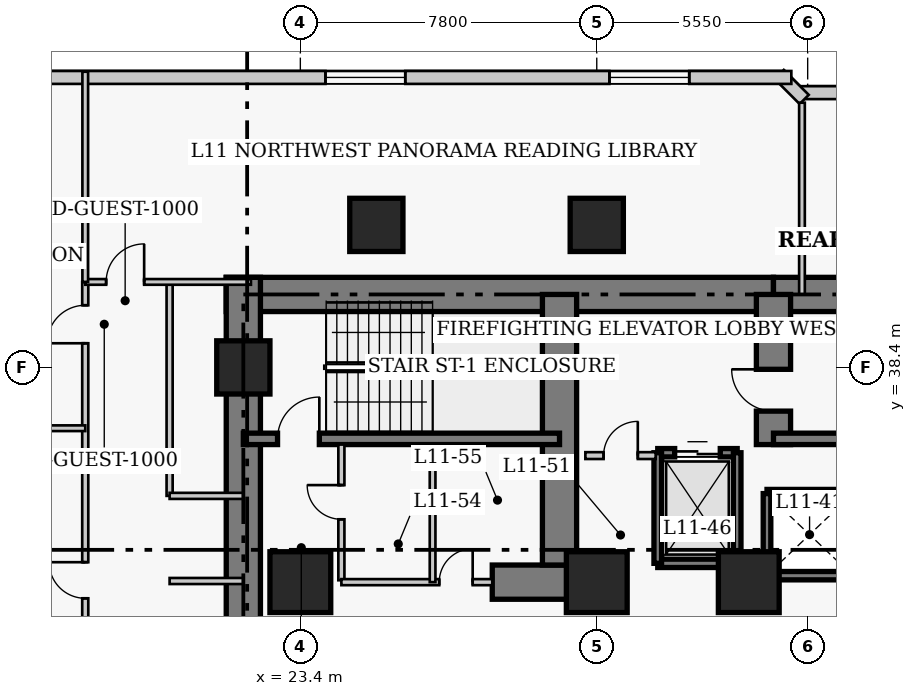
"""IFC4 building model, lengths in metres.
Left out: names, types, materials, properties, quantities, classifications, styles, units other than length and angle.
Written with IfcOpenShell. Run it as: python <this file> out.ifc"""

import sys

from ifc_helpers import new_model, si_unit, direction, frame, frame_2d, origin, origin_2d, place, context, subcontext, project, spatial, rectangle, extrude, element, fill, save


model = new_model("IFC4")
c1 = context("Model", 3, precision=1e-05, world=origin(), true_north=direction((0.0, 1.0)))
c2 = subcontext(c1, "Body", "Model", "MODEL_VIEW")
j1 = project(units=[si_unit("LENGTHUNIT", "METRE"), si_unit("PLANEANGLEUNIT", "RADIAN")], contexts=[c1])
p1 = place(None, origin())
s1 = spatial("IfcSite", under=j1, at=p1, CompositionType="ELEMENT")
p2 = place(p1, origin())
s2 = spatial("IfcBuilding", under=s1, at=p2, CompositionType="ELEMENT")
p3 = place(p2, frame((0.0, 0.0, 48.8)))
s3 = spatial("IfcBuildingStorey", under=s2, at=p3, CompositionType="ELEMENT", Elevation=48.8)
p4 = place(p3, frame((21.45, 40.32, 0.0), z_axis=(0.0, 0.0, 1.0), x_axis=(1.0, 0.0, 0.0)))
e1 = element("IfcWall", 1, at=p4, inside=s3, PredefinedType="SHEAR", context=c2, shape_type="SweptSolid", body=[
    extrude(rectangle(XDim=14.4, YDim=0.9, at=frame_2d((7.2, 0.0))), origin(), (0.0, 0.0, 1.0), 3.8),
])
p5 = place(p3, frame((35.85, 40.32, 0.0), z_axis=(0.0, 0.0, 1.0), x_axis=(1.0, 0.0, 0.0)))
e2 = element("IfcWall", 2, at=p5, inside=s3, PredefinedType="SHEAR", context=c2, shape_type="SweptSolid", body=[
    extrude(rectangle(XDim=12.6, YDim=0.9, at=frame_2d((6.3, 0.0))), origin(), (0.0, 0.0, 1.0), 3.8),
])
p6 = place(p3, frame((21.9, 27.05, 0.0), z_axis=(0.0, 0.0, 1.0), x_axis=(0.0, 1.0, 0.0)))
e3 = element("IfcWall", 3, at=p6, inside=s3, PredefinedType="SHEAR", context=c2, shape_type="SweptSolid", body=[
    extrude(rectangle(XDim=13.72, YDim=0.9, at=frame_2d((6.86, 0.0))), origin(), (0.0, 0.0, 1.0), 3.8),
])
p7 = place(p3, frame((28.45, 32.75, 0.0), z_axis=(0.0, 0.0, 1.0), x_axis=(1.0, 0.0, 0.0)))
e4 = element("IfcWall", 4, at=p7, inside=s3, PredefinedType="SHEAR", context=c2, shape_type="SweptSolid", body=[
    extrude(rectangle(XDim=2.4, YDim=0.9, at=frame_2d((1.2, 0.0))), origin(), (0.0, 0.0, 1.0), 3.8),
])
p8 = place(p3, frame((30.22, 33.2, 0.0), z_axis=(0.0, 0.0, 1.0), x_axis=(0.0, 1.0, 0.0)))
e5 = element("IfcWall", 5, at=p8, inside=s3, PredefinedType="SHEAR", context=c2, shape_type="SweptSolid", body=[
    extrude(rectangle(XDim=7.12, YDim=0.9, at=frame_2d((3.56, 0.0))), origin(), (0.0, 0.0, 1.0), 3.8),
])
p9 = place(p3, frame((35.85, 36.37, 0.0), z_axis=(0.0, 0.0, 1.0), x_axis=(0.0, 1.0, 0.0)))
e6 = element("IfcWall", 6, at=p9, inside=s3, PredefinedType="SHEAR", context=c2, shape_type="SweptSolid", body=[
    extrude(rectangle(XDim=3.95, YDim=0.9, at=frame_2d((1.975, 0.0))), origin(), (0.0, 0.0, 1.0), 3.8),
])
p10 = place(p9, frame((0.88, 0.0, 0.0)))
e7 = element("IfcOpeningElement", 7, at=p10, cuts=e6, PredefinedType="OPENING", context=c2, shape_type="SweptSolid", body=[
    extrude(rectangle(XDim=1.1, YDim=2.15, at=frame_2d((0.55, 1.075))), frame((0.0, 0.46, 0.0), z_axis=(0.0, -1.0, 0.0), x_axis=(1.0, 0.0, 0.0)), (0.0, 0.0, 1.0), 0.92),
])
p11 = place(p3, frame((21.9, 36.52, 0.0), z_axis=(0.0, 0.0, 1.0), x_axis=(1.0, 0.0, 0.0)))
e8 = element("IfcWall", 8, at=p11, inside=s3, PredefinedType="SHEAR", context=c2, shape_type="SweptSolid", body=[
    extrude(rectangle(XDim=8.32, YDim=0.3, at=frame_2d((4.16, 0.0))), origin(), (0.0, 0.0, 1.0), 3.8),
])
p12 = place(p11, frame((0.9, 0.0, 0.0)))
e9 = element("IfcOpeningElement", 9, at=p12, cuts=e8, PredefinedType="OPENING", context=c2, shape_type="SweptSolid", body=[
    extrude(rectangle(XDim=1.1, YDim=2.15, at=frame_2d((0.55, 1.075))), frame((0.0, 0.16, 0.0), z_axis=(0.0, -1.0, 0.0), x_axis=(1.0, 0.0, 0.0)), (0.0, 0.0, 1.0), 0.32),
])
p13 = place(p3, frame((35.85, 36.52, 0.0), z_axis=(0.0, 0.0, 1.0), x_axis=(1.0, 0.0, 0.0)))
e10 = element("IfcWall", 10, at=p13, inside=s3, PredefinedType="SHEAR", context=c2, shape_type="SweptSolid", body=[
    extrude(rectangle(XDim=8.33, YDim=0.3, at=frame_2d((4.165, 0.0))), origin(), (0.0, 0.0, 1.0), 3.8),
])
p14 = place(p3, frame((21.9, 38.4, 0.0), z_axis=(0.0, 0.0, 1.0), x_axis=(1.0, 0.0, 0.0)))
e11 = element("IfcColumn", 11, at=p14, inside=s3, PredefinedType="COLUMN", context=c2, shape_type="SweptSolid", body=[
    extrude(rectangle(XDim=1.4, YDim=1.4, at=origin_2d()), origin(), (0.0, 0.0, 1.0), 3.8),
])
for number, where, z_axis, x_axis in (
    (12, (23.4, 32.75, 0.0), (0.0, 0.0, 1.0), (1.0, 0.0, 0.0)),
    (13, (31.2, 32.75, 0.0), (0.0, 0.0, 1.0), (1.0, 0.0, 0.0)),
    (14, (35.2, 32.75, 0.0), (0.0, 0.0, 1.0), (1.0, 0.0, 0.0)),
):
    element("IfcColumn", number, at=place(p3, frame(where, z_axis=z_axis, x_axis=x_axis)), inside=s3, PredefinedType="COLUMN", context=c2, shape_type="SweptSolid", body=[
        extrude(rectangle(XDim=1.6, YDim=1.6, at=origin_2d()), origin(), (0.0, 0.0, 1.0), 3.8),
    ])
for number, where, z_axis, x_axis in (
    (15, (25.4, 42.15, 0.0), (0.0, 0.0, 1.0), (1.0, 0.0, 0.0)),
    (16, (31.2, 42.15, 0.0), (0.0, 0.0, 1.0), (1.0, 0.0, 0.0)),
):
    element("IfcColumn", number, at=place(p3, frame(where, z_axis=z_axis, x_axis=x_axis)), inside=s3, PredefinedType="COLUMN", context=c2, shape_type="SweptSolid", body=[
        extrude(rectangle(XDim=1.4, YDim=1.4, at=origin_2d()), origin(), (0.0, 0.0, 1.0), 3.8),
    ])
p15 = place(p3, frame((41.42, 45.63, 0.0), z_axis=(0.0, 0.0, 1.0), x_axis=(-1.0, 0.0, 0.0)))
e17 = element("IfcWall", 17, at=p15, inside=s3, PredefinedType="SOLIDWALL", context=c2, shape_type="SweptSolid", body=[
    extrude(rectangle(XDim=4.84, YDim=0.34, at=frame_2d((2.42, 0.0))), origin(), (0.0, 0.0, 1.0), 3.54),
])
p16 = place(p15, frame((1.37, 0.0, 0.85)))
e18 = element("IfcOpeningElement", 18, at=p16, cuts=e17, PredefinedType="OPENING", context=c2, shape_type="SweptSolid", body=[
    extrude(rectangle(XDim=2.1, YDim=1.85, at=frame_2d((1.05, 0.925))), frame((0.0, 0.18, 0.0), z_axis=(0.0, -1.0, 0.0), x_axis=(1.0, 0.0, 0.0)), (0.0, 0.0, 1.0), 0.36),
])
p17 = place(p3, frame((36.658, 45.451, 0.0), z_axis=(0.0, 0.0, 1.0), x_axis=(-0.707106781187, 0.707106781187, 0.0)))
e19 = element("IfcWall", 19, at=p17, inside=s3, PredefinedType="SOLIDWALL", context=c2, shape_type="SweptSolid", body=[
    extrude(rectangle(XDim=0.929, YDim=0.34, at=frame_2d((0.464, 0.0))), origin(), (0.0, 0.0, 1.0), 3.54),
])
p18 = place(p3, frame((36.32, 46.03, 0.0), z_axis=(0.0, 0.0, 1.0), x_axis=(-1.0, 0.0, 0.0)))
e20 = element("IfcWall", 20, at=p18, inside=s3, PredefinedType="SOLIDWALL", context=c2, shape_type="SweptSolid", body=[
    extrude(rectangle(XDim=29.89, YDim=0.34, at=frame_2d((14.945, 0.0))), origin(), (0.0, 0.0, 1.0), 3.54),
])
p19 = place(p18, frame((2.686, 0.0, 0.85)))
e21 = element("IfcOpeningElement", 21, at=p19, cuts=e20, PredefinedType="OPENING", context=c2, shape_type="SweptSolid", body=[
    extrude(rectangle(XDim=2.1, YDim=1.85, at=frame_2d((1.05, 0.925))), frame((0.0, 0.18, 0.0), z_axis=(0.0, -1.0, 0.0), x_axis=(1.0, 0.0, 0.0)), (0.0, 0.0, 1.0), 0.36),
])
p20 = place(p18, frame((10.159, 0.0, 0.85)))
e22 = element("IfcOpeningElement", 22, at=p20, cuts=e20, PredefinedType="OPENING", context=c2, shape_type="SweptSolid", body=[
    extrude(rectangle(XDim=2.1, YDim=1.85, at=frame_2d((1.05, 0.925))), frame((0.0, 0.18, 0.0), z_axis=(0.0, -1.0, 0.0), x_axis=(1.0, 0.0, 0.0)), (0.0, 0.0, 1.0), 0.36),
])
p21 = place(p18, frame((25.104, 0.0, 0.85)))
e23 = element("IfcOpeningElement", 23, at=p21, cuts=e20, PredefinedType="OPENING", context=c2, shape_type="SweptSolid", body=[
    extrude(rectangle(XDim=2.1, YDim=1.85, at=frame_2d((1.05, 0.925))), frame((0.0, 0.18, 0.0), z_axis=(0.0, -1.0, 0.0), x_axis=(1.0, 0.0, 0.0)), (0.0, 0.0, 1.0), 0.36),
])
for number, where, z_axis, x_axis in (
    (24, (35.68, 35.08, 0.0), (0.0, 0.0, 1.0), (1.0, 0.0, 0.0)),
    (25, (35.68, 32.92, 0.0), (0.0, 0.0, 1.0), (1.0, 0.0, 0.0)),
):
    element("IfcWall", number, at=place(p3, frame(where, z_axis=z_axis, x_axis=x_axis)), inside=s3, PredefinedType="SHEAR", context=c2, shape_type="SweptSolid", body=[
        extrude(rectangle(XDim=2.32, YDim=0.22, at=frame_2d((1.16, 0.0))), origin(), (0.0, 0.0, 1.0), 3.8),
    ])
p22 = place(p3, frame((35.68, 32.92, 0.0), z_axis=(0.0, 0.0, 1.0), x_axis=(0.0, 1.0, 0.0)))
e26 = element("IfcWall", 26, at=p22, inside=s3, PredefinedType="SHEAR", context=c2, shape_type="SweptSolid", body=[
    extrude(rectangle(XDim=2.16, YDim=0.2, at=frame_2d((1.08, 0.0))), origin(), (0.0, 0.0, 1.0), 3.8),
])
p23 = place(p3, frame((32.805, 36.155, 0.0), z_axis=(0.0, 0.0, 1.0), x_axis=(1.0, 0.0, 0.0)))
e27 = element("IfcWall", 27, at=p23, inside=s3, PredefinedType="SHEAR", context=c2, shape_type="SweptSolid", body=[
    extrude(rectangle(XDim=2.09, YDim=0.22, at=frame_2d((1.045, 0.0))), origin(), (0.0, 0.0, 1.0), 3.8),
])
p24 = place(p23, frame((0.445, 0.0, 0.0)))
e28 = element("IfcOpeningElement", 28, at=p24, cuts=e27, PredefinedType="OPENING", context=c2, shape_type="SweptSolid", body=[
    extrude(rectangle(XDim=1.2, YDim=2.15, at=frame_2d((0.6, 1.075))), frame((0.0, 0.12, 0.0), z_axis=(0.0, -1.0, 0.0), x_axis=(1.0, 0.0, 0.0)), (0.0, 0.0, 1.0), 0.24),
])
p25 = place(p3, frame((32.805, 33.245, 0.0), z_axis=(0.0, 0.0, 1.0), x_axis=(1.0, 0.0, 0.0)))
e29 = element("IfcWall", 29, at=p25, inside=s3, PredefinedType="SHEAR", context=c2, shape_type="SweptSolid", body=[
    extrude(rectangle(XDim=2.09, YDim=0.22, at=frame_2d((1.045, 0.0))), origin(), (0.0, 0.0, 1.0), 3.8),
])
for number, where, z_axis, x_axis in (
    (30, (32.805, 33.245, 0.0), (0.0, 0.0, 1.0), (0.0, 1.0, 0.0)),
    (31, (34.895, 33.245, 0.0), (0.0, 0.0, 1.0), (0.0, 1.0, 0.0)),
):
    element("IfcWall", number, at=place(p3, frame(where, z_axis=z_axis, x_axis=x_axis)), inside=s3, PredefinedType="SHEAR", context=c2, shape_type="SweptSolid", body=[
        extrude(rectangle(XDim=2.91, YDim=0.2, at=frame_2d((1.455, 0.0))), origin(), (0.0, 0.0, 1.0), 3.8),
    ])
p26 = place(p3, frame((30.9, 36.08, 0.0), z_axis=(0.0, 0.0, 1.0), x_axis=(1.0, 0.0, 0.0)))
e32 = element("IfcWall", 32, at=p26, inside=s3, PredefinedType="PARTITIONING", context=c2, shape_type="SweptSolid", body=[
    extrude(rectangle(XDim=1.85, YDim=0.18, at=frame_2d((0.925, 0.0))), origin(), (0.0, 0.0, 1.0), 3.54),
])
p27 = place(p26, frame((0.48, 0.0, 0.0)))
e33 = element("IfcOpeningElement", 33, at=p27, cuts=e32, PredefinedType="OPENING", context=c2, shape_type="SweptSolid", body=[
    extrude(rectangle(XDim=0.9, YDim=2.15, at=frame_2d((0.45, 1.075))), frame((0.0, 0.1, 0.0), z_axis=(0.0, -1.0, 0.0), x_axis=(1.0, 0.0, 0.0)), (0.0, 0.0, 1.0), 0.2),
])
p28 = place(p3, frame((24.48, 32.8, 0.0), z_axis=(0.0, 0.0, 1.0), x_axis=(0.0, 1.0, 0.0)))
e34 = element("IfcWall", 34, at=p28, inside=s3, PredefinedType="PARTITIONING", context=c2, shape_type="SweptSolid", body=[
    extrude(rectangle(XDim=3.57, YDim=0.16, at=frame_2d((1.785, 0.0))), origin(), (0.0, 0.0, 1.0), 3.54),
])
p29 = place(p28, frame((1.604, 0.0, 0.0)))
e35 = element("IfcOpeningElement", 35, at=p29, cuts=e34, PredefinedType="OPENING", context=c2, shape_type="SweptSolid", body=[
    extrude(rectangle(XDim=0.9, YDim=2.1, at=frame_2d((0.45, 1.05))), frame((0.0, 0.09, 0.0), z_axis=(0.0, -1.0, 0.0), x_axis=(1.0, 0.0, 0.0)), (0.0, 0.0, 1.0), 0.18),
])
p30 = place(p3, frame((24.48, 32.75, 0.0), z_axis=(0.0, 0.0, 1.0), x_axis=(1.0, 0.0, 0.0)))
e36 = element("IfcWall", 36, at=p30, inside=s3, PredefinedType="PARTITIONING", context=c2, shape_type="SweptSolid", body=[
    extrude(rectangle(XDim=3.97, YDim=0.16, at=frame_2d((1.985, 0.0))), origin(), (0.0, 0.0, 1.0), 3.54),
])
p31 = place(p30, frame((2.575, 0.0, 0.0)))
e37 = element("IfcOpeningElement", 37, at=p31, cuts=e36, PredefinedType="OPENING", context=c2, shape_type="SweptSolid", body=[
    extrude(rectangle(XDim=0.88, YDim=2.05, at=frame_2d((0.44, 1.025))), frame((0.0, 0.09, 0.0), z_axis=(0.0, -1.0, 0.0), x_axis=(1.0, 0.0, 0.0)), (0.0, 0.0, 1.0), 0.18),
])
p32 = place(p3, frame((26.88, 32.75, 0.0), z_axis=(0.0, 0.0, 1.0), x_axis=(0.0, 1.0, 0.0)))
e38 = element("IfcWall", 38, at=p32, inside=s3, PredefinedType="PARTITIONING", context=c2, shape_type="SweptSolid", body=[
    extrude(rectangle(XDim=3.62, YDim=0.15, at=frame_2d((1.81, 0.0))), origin(), (0.0, 0.0, 1.0), 3.54),
])
p33 = place(p3, frame((17.74, 5.05, 0.0), z_axis=(0.0, 0.0, 1.0), x_axis=(0.0, 1.0, 0.0)))
e39 = element("IfcWall", 39, at=p33, inside=s3, PredefinedType="PARTITIONING", context=c2, shape_type="SweptSolid", body=[
    extrude(rectangle(XDim=35.6, YDim=0.16, at=frame_2d((17.8, 0.0))), origin(), (0.0, 0.0, 1.0), 3.54),
])
p34 = place(p33, frame((2.6, 0.0, 0.0)))
e40 = element("IfcOpeningElement", 40, at=p34, cuts=e39, PredefinedType="OPENING", context=c2, shape_type="SweptSolid", body=[
    extrude(rectangle(XDim=0.95, YDim=2.1, at=frame_2d((0.475, 1.05))), frame((0.0, 0.09, 0.0), z_axis=(0.0, -1.0, 0.0), x_axis=(1.0, 0.0, 0.0)), (0.0, 0.0, 1.0), 0.18),
])
p35 = place(p33, frame((10.075, 0.0, 0.0)))
e41 = element("IfcOpeningElement", 41, at=p35, cuts=e39, PredefinedType="OPENING", context=c2, shape_type="SweptSolid", body=[
    extrude(rectangle(XDim=0.95, YDim=2.1, at=frame_2d((0.475, 1.05))), frame((0.0, 0.09, 0.0), z_axis=(0.0, -1.0, 0.0), x_axis=(1.0, 0.0, 0.0)), (0.0, 0.0, 1.0), 0.18),
])
p36 = place(p33, frame((18.875, 0.0, 0.0)))
e42 = element("IfcOpeningElement", 42, at=p36, cuts=e39, PredefinedType="OPENING", context=c2, shape_type="SweptSolid", body=[
    extrude(rectangle(XDim=0.95, YDim=2.1, at=frame_2d((0.475, 1.05))), frame((0.0, 0.09, 0.0), z_axis=(0.0, -1.0, 0.0), x_axis=(1.0, 0.0, 0.0)), (0.0, 0.0, 1.0), 0.18),
])
p37 = place(p33, frame((27.275, 0.0, 0.0)))
e43 = element("IfcOpeningElement", 43, at=p37, cuts=e39, PredefinedType="OPENING", context=c2, shape_type="SweptSolid", body=[
    extrude(rectangle(XDim=0.95, YDim=2.1, at=frame_2d((0.475, 1.05))), frame((0.0, 0.09, 0.0), z_axis=(0.0, -1.0, 0.0), x_axis=(1.0, 0.0, 0.0)), (0.0, 0.0, 1.0), 0.18),
])
p38 = place(p33, frame((33.986, 0.0, 0.0)))
e44 = element("IfcOpeningElement", 44, at=p38, cuts=e39, PredefinedType="OPENING", context=c2, shape_type="SweptSolid", body=[
    extrude(rectangle(XDim=1.0, YDim=2.15, at=frame_2d((0.5, 1.075))), frame((0.0, 0.09, 0.0), z_axis=(0.0, -1.0, 0.0), x_axis=(1.0, 0.0, 0.0)), (0.0, 0.0, 1.0), 0.18),
])
p39 = place(p3, frame((19.96, 35.02, 0.0), z_axis=(0.0, 0.0, 1.0), x_axis=(0.0, 1.0, 0.0)))
e45 = element("IfcWall", 45, at=p39, inside=s3, PredefinedType="PARTITIONING", context=c2, shape_type="SweptSolid", body=[
    extrude(rectangle(XDim=5.63, YDim=0.16, at=frame_2d((2.815, 0.0))), origin(), (0.0, 0.0, 1.0), 3.54),
])
for number, where, z_axis, x_axis in (
    (46, (19.96, 35.02, 0.0), (0.0, 0.0, 1.0), (1.0, 0.0, 0.0)),
    (47, (19.96, 32.78, 0.0), (0.0, 0.0, 1.0), (1.0, 0.0, 0.0)),
):
    element("IfcWall", number, at=place(p3, frame(where, z_axis=z_axis, x_axis=x_axis)), inside=s3, PredefinedType="PARTITIONING", context=c2, shape_type="SweptSolid", body=[
        extrude(rectangle(XDim=1.94, YDim=0.16, at=frame_2d((0.97, 0.0))), origin(), (0.0, 0.0, 1.0), 3.54),
    ])
p40 = place(p3, frame((17.74, 40.65, 0.0), z_axis=(0.0, 0.0, 1.0), x_axis=(1.0, 0.0, 0.0)))
e48 = element("IfcWall", 48, at=p40, inside=s3, PredefinedType="PARTITIONING", context=c2, shape_type="SweptSolid", body=[
    extrude(rectangle(XDim=4.36, YDim=0.15, at=frame_2d((2.18, 0.0))), origin(), (0.0, 0.0, 1.0), 3.54),
])
p41 = place(p40, frame((0.55, 0.0, 0.0)))
e49 = element("IfcOpeningElement", 49, at=p41, cuts=e48, PredefinedType="OPENING", context=c2, shape_type="SweptSolid", body=[
    extrude(rectangle(XDim=1.0, YDim=2.15, at=frame_2d((0.5, 1.075))), frame((0.0, 0.085, 0.0), z_axis=(0.0, -1.0, 0.0), x_axis=(1.0, 0.0, 0.0)), (0.0, 0.0, 1.0), 0.17),
])
p42 = place(p3, frame((17.74, 40.65, 0.0), z_axis=(0.0, 0.0, 1.0), x_axis=(0.0, 1.0, 0.0)))
e50 = element("IfcWall", 50, at=p42, inside=s3, PredefinedType="PARTITIONING", context=c2, shape_type="SweptSolid", body=[
    extrude(rectangle(XDim=5.53, YDim=0.15, at=frame_2d((2.765, 0.0))), origin(), (0.0, 0.0, 1.0), 3.54),
])
p43 = place(p3, frame((36.6, 40.32, 0.0), z_axis=(0.0, 0.0, 1.0), x_axis=(0.0, 1.0, 0.0)))
e51 = element("IfcWall", 51, at=p43, inside=s3, PredefinedType="PARTITIONING", context=c2, shape_type="SweptSolid", body=[
    extrude(rectangle(XDim=5.045, YDim=0.15, at=frame_2d((2.522, 0.0))), origin(), (0.0, 0.0, 1.0), 3.54),
])
p44 = place(p3, frame((14.45, 36.8, 0.0), z_axis=(0.0, 0.0, 1.0), x_axis=(1.0, 0.0, 0.0)))
e52 = element("IfcWall", 52, at=p44, inside=s3, PredefinedType="PARTITIONING", context=c2, shape_type="SweptSolid", body=[
    extrude(rectangle(XDim=3.29, YDim=0.15, at=frame_2d((1.645, 0.0))), origin(), (0.0, 0.0, 1.0), 3.54),
])
p45 = place(p19, origin())
e53 = element("IfcWindow", 53, at=p45, inside=s3, PartitioningType="SINGLE_PANEL", PredefinedType="WINDOW", context=c2, shape_type="SweptSolid", body=[
    extrude(rectangle(XDim=2.1, YDim=1.85, at=frame_2d((1.05, 0.925))), frame((0.0, 0.03, 0.0), z_axis=(0.0, -1.0, 0.0), x_axis=(1.0, 0.0, 0.0)), (0.0, 0.0, 1.0), 0.06),
])
fill(e21, e53)
p46 = place(p20, origin())
e54 = element("IfcWindow", 54, at=p46, inside=s3, PartitioningType="SINGLE_PANEL", PredefinedType="WINDOW", context=c2, shape_type="SweptSolid", body=[
    extrude(rectangle(XDim=2.1, YDim=1.85, at=frame_2d((1.05, 0.925))), frame((0.0, 0.03, 0.0), z_axis=(0.0, -1.0, 0.0), x_axis=(1.0, 0.0, 0.0)), (0.0, 0.0, 1.0), 0.06),
])
fill(e22, e54)
p47 = place(p24, origin())
e55 = element("IfcDoor", 55, at=p47, inside=s3, OperationType="DOUBLE_DOOR_SLIDING", PredefinedType="DOOR", context=c2, shape_type="SweptSolid", body=[
    extrude(rectangle(XDim=1.2, YDim=2.15, at=frame_2d((0.6, 1.075))), frame((0.0, 0.025, 0.0), z_axis=(0.0, -1.0, 0.0), x_axis=(1.0, 0.0, 0.0)), (0.0, 0.0, 1.0), 0.05),
])
fill(e28, e55)
p48 = place(p27, origin())
e56 = element("IfcDoor", 56, at=p48, inside=s3, OperationType="SINGLE_SWING_RIGHT", PredefinedType="DOOR", context=c2, shape_type="SweptSolid", body=[
    extrude(rectangle(XDim=0.9, YDim=2.15, at=frame_2d((0.45, 1.075))), frame((0.0, 0.025, 0.0), z_axis=(0.0, -1.0, 0.0), x_axis=(1.0, 0.0, 0.0)), (0.0, 0.0, 1.0), 0.05),
])
fill(e33, e56)
p49 = place(p29, origin())
e57 = element("IfcDoor", 57, at=p49, inside=s3, OperationType="SINGLE_SWING_RIGHT", PredefinedType="DOOR", context=c2, shape_type="SweptSolid", body=[
    extrude(rectangle(XDim=0.9, YDim=2.1, at=frame_2d((0.45, 1.05))), frame((0.0, 0.025, 0.0), z_axis=(0.0, -1.0, 0.0), x_axis=(1.0, 0.0, 0.0)), (0.0, 0.0, 1.0), 0.05),
])
fill(e35, e57)
p50 = place(p31, origin())
e58 = element("IfcDoor", 58, at=p50, inside=s3, OperationType="SINGLE_SWING_RIGHT", PredefinedType="DOOR", context=c2, shape_type="SweptSolid", body=[
    extrude(rectangle(XDim=0.88, YDim=2.05, at=frame_2d((0.44, 1.025))), frame((0.0, 0.025, 0.0), z_axis=(0.0, -1.0, 0.0), x_axis=(1.0, 0.0, 0.0)), (0.0, 0.0, 1.0), 0.05),
])
fill(e37, e58)
p51 = place(p41, origin())
e59 = element("IfcDoor", 59, at=p51, inside=s3, OperationType="SINGLE_SWING_RIGHT", PredefinedType="DOOR", context=c2, shape_type="SweptSolid", body=[
    extrude(rectangle(XDim=1.0, YDim=2.15, at=frame_2d((0.5, 1.075))), frame((0.0, 0.025, 0.0), z_axis=(0.0, -1.0, 0.0), x_axis=(1.0, 0.0, 0.0)), (0.0, 0.0, 1.0), 0.05),
])
fill(e49, e59)
p52 = place(p37, origin())
e60 = element("IfcDoor", 60, at=p52, inside=s3, OperationType="SINGLE_SWING_RIGHT", PredefinedType="DOOR", context=c2, shape_type="SweptSolid", body=[
    extrude(rectangle(XDim=0.95, YDim=2.1, at=frame_2d((0.475, 1.05))), frame((0.0, 0.025, 0.0), z_axis=(0.0, -1.0, 0.0), x_axis=(1.0, 0.0, 0.0)), (0.0, 0.0, 1.0), 0.05),
])
fill(e43, e60)
p53 = place(p38, origin())
e61 = element("IfcDoor", 61, at=p53, inside=s3, OperationType="SINGLE_SWING_LEFT", PredefinedType="DOOR", context=c2, shape_type="SweptSolid", body=[
    extrude(rectangle(XDim=1.0, YDim=2.15, at=frame_2d((0.5, 1.075))), frame((0.0, 0.025, 0.0), z_axis=(0.0, -1.0, 0.0), x_axis=(1.0, 0.0, 0.0)), (0.0, 0.0, 1.0), 0.05),
])
fill(e44, e61)
p54 = place(p12, origin())
e62 = element("IfcDoor", 62, at=p54, inside=s3, OperationType="SINGLE_SWING_RIGHT", PredefinedType="DOOR", context=c2, shape_type="SweptSolid", body=[
    extrude(rectangle(XDim=1.1, YDim=2.15, at=frame_2d((0.55, 1.075))), frame((0.0, 0.025, 0.0), z_axis=(0.0, -1.0, 0.0), x_axis=(1.0, 0.0, 0.0)), (0.0, 0.0, 1.0), 0.05),
])
fill(e9, e62)
p55 = place(p10, origin())
e63 = element("IfcDoor", 63, at=p55, inside=s3, OperationType="SINGLE_SWING_RIGHT", PredefinedType="DOOR", context=c2, shape_type="SweptSolid", body=[
    extrude(rectangle(XDim=1.1, YDim=2.15, at=frame_2d((0.55, 1.075))), frame((0.0, 0.025, 0.0), z_axis=(0.0, -1.0, 0.0), x_axis=(1.0, 0.0, 0.0)), (0.0, 0.0, 1.0), 0.05),
])
fill(e7, e63)
save(model, sys.argv[1])
